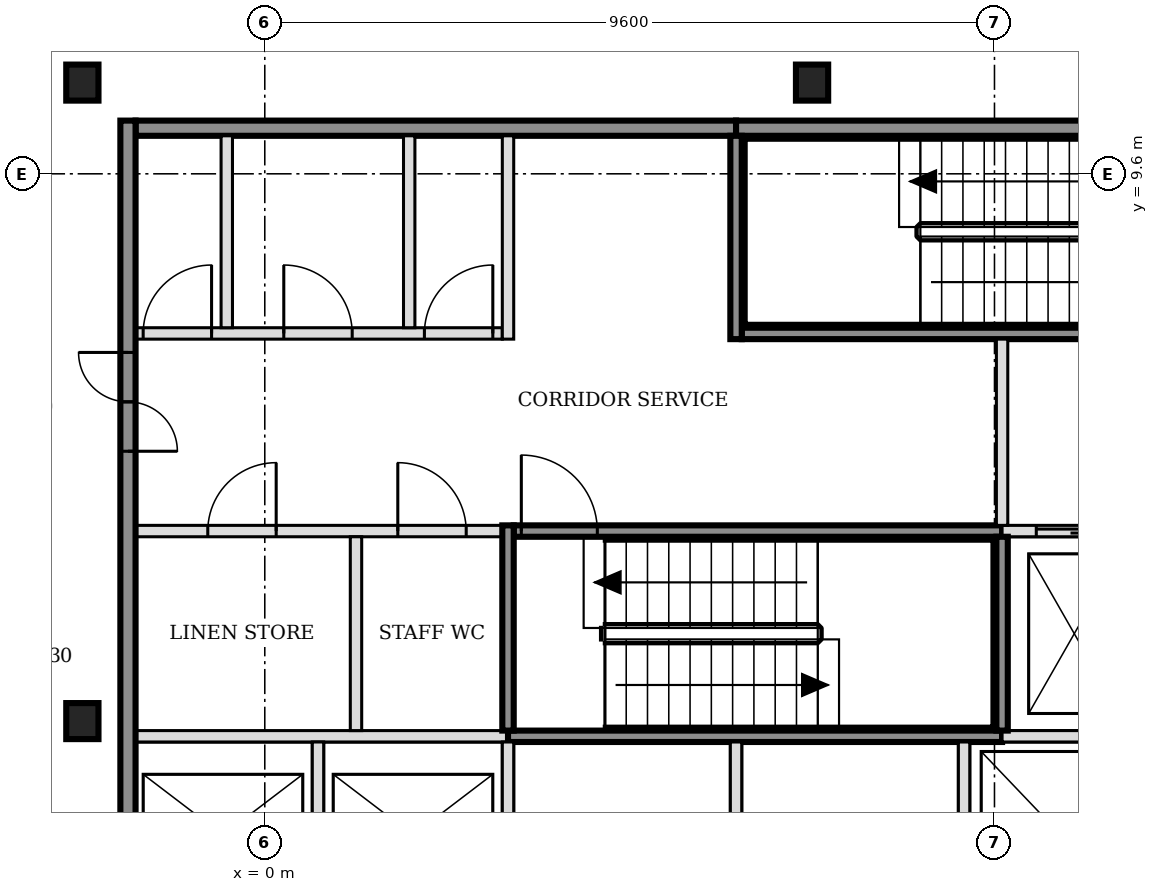
"""IFC4 building model, lengths in metres.
Left out: names, types, materials, properties, quantities, classifications, styles, units other than length and angle.
Written with IfcOpenShell. Run it as: python <this file> out.ifc"""

import sys

from ifc_helpers import new_model, si_unit, direction, frame, frame_2d, origin, origin_2d, place, context, subcontext, project, spatial, rectangle, i_section, extrude, element, fill, save


model = new_model("IFC4")
c1 = context("Model", 3, precision=1e-05, world=origin(), true_north=direction((0.0, 1.0)))
c2 = subcontext(c1, "Body", "Model", "MODEL_VIEW")
j1 = project(units=[si_unit("LENGTHUNIT", "METRE"), si_unit("PLANEANGLEUNIT", "RADIAN")], contexts=[c1])
p1 = place(None, origin())
s1 = spatial("IfcSite", under=j1, at=p1, CompositionType="ELEMENT")
p2 = place(p1, origin())
s2 = spatial("IfcBuilding", under=s1, at=p2, CompositionType="ELEMENT")
p3 = place(p2, frame((0.0, 0.0, 108.6)))
s3 = spatial("IfcBuildingStorey", under=s2, at=p3, CompositionType="ELEMENT", Elevation=108.6)
for number, where, z_axis, x_axis in (
    (1, (-2.4, 2.4, -0.15), (0.0, 0.0, 1.0), (1.0, 0.0, 0.0)),
    (2, (-2.4, 10.8, -0.15), (0.0, 0.0, 1.0), (1.0, 0.0, 0.0)),
    (3, (7.2, 10.8, -0.15), (0.0, 0.0, 1.0), (1.0, 0.0, 0.0)),
):
    element("IfcColumn", number, at=place(p3, frame(where, z_axis=z_axis, x_axis=x_axis)), inside=s3, PredefinedType="COLUMN", context=c2, shape_type="SweptSolid", body=[
        extrude(i_section(OverallWidth=0.424, OverallDepth=0.474, WebThickness=0.048, FlangeThickness=0.077, FilletRadius=0.015, at=origin_2d()), origin(), (0.0, 0.0, 1.0), 3.6),
    ])
p4 = place(p3, frame((-1.7, 2.2, 0.0), z_axis=(0.0, 0.0, 1.0), x_axis=(1.0, 0.0, 0.0)))
e4 = element("IfcWall", 4, at=p4, inside=s3, PredefinedType="SOLIDWALL", context=c2, shape_type="SweptSolid", body=[
    extrude(rectangle(XDim=4.9, YDim=0.15, at=frame_2d((2.45, 0.0))), origin(), (0.0, 0.0, 1.0), 3.45),
])
p5 = place(p3, frame((3.2, 2.2, 0.0), z_axis=(0.0, 0.0, 1.0), x_axis=(1.0, 0.0, 0.0)))
e5 = element("IfcWall", 5, at=p5, inside=s3, PredefinedType="SOLIDWALL", context=c2, shape_type="SweptSolid", body=[
    extrude(rectangle(XDim=6.5, YDim=0.15, at=frame_2d((3.25, 0.0))), origin(), (0.0, 0.0, 1.0), 3.45),
])
p6 = place(p3, frame((9.7, 2.2, 0.0), z_axis=(0.0, 0.0, 1.0), x_axis=(1.0, 0.0, 0.0)))
e6 = element("IfcWall", 6, at=p6, inside=s3, PredefinedType="SOLIDWALL", context=c2, shape_type="SweptSolid", body=[
    extrude(rectangle(XDim=4.525, YDim=0.15, at=frame_2d((2.263, 0.0))), origin(), (0.0, 0.0, 1.0), 3.45),
])
p7 = place(p3, frame((-1.7, 4.9, 0.0), z_axis=(0.0, 0.0, 1.0), x_axis=(1.0, 0.0, 0.0)))
e7 = element("IfcWall", 7, at=p7, inside=s3, PredefinedType="PARTITIONING", context=c2, shape_type="SweptSolid", body=[
    extrude(rectangle(XDim=4.825, YDim=0.15, at=frame_2d((2.413, 0.0))), origin(), (0.0, 0.0, 1.0), 3.45),
])
p8 = place(p7, frame((0.95, 0.0, 0.0)))
e8 = element("IfcOpeningElement", 8, at=p8, cuts=e7, PredefinedType="OPENING", context=c2, shape_type="SweptSolid", body=[
    extrude(rectangle(XDim=0.9, YDim=2.1, at=frame_2d((0.45, 1.05))), frame((0.0, 0.085, 0.0), z_axis=(0.0, -1.0, 0.0), x_axis=(1.0, 0.0, 0.0)), (0.0, 0.0, 1.0), 0.17),
])
p9 = place(p7, frame((3.45, 0.0, 0.0)))
e9 = element("IfcOpeningElement", 9, at=p9, cuts=e7, PredefinedType="OPENING", context=c2, shape_type="SweptSolid", body=[
    extrude(rectangle(XDim=0.9, YDim=2.1, at=frame_2d((0.45, 1.05))), frame((0.0, 0.085, 0.0), z_axis=(0.0, -1.0, 0.0), x_axis=(1.0, 0.0, 0.0)), (0.0, 0.0, 1.0), 0.17),
])
p10 = place(p3, frame((3.275, 4.9, 0.0), z_axis=(0.0, 0.0, 1.0), x_axis=(1.0, 0.0, 0.0)))
e10 = element("IfcWall", 10, at=p10, inside=s3, PredefinedType="SOLIDWALL", context=c2, shape_type="SweptSolid", body=[
    extrude(rectangle(XDim=6.425, YDim=0.15, at=frame_2d((3.212, 0.0))), origin(), (0.0, 0.0, 1.0), 3.45),
])
p11 = place(p10, frame((0.1, 0.0, 0.0)))
e11 = element("IfcOpeningElement", 11, at=p11, cuts=e10, PredefinedType="OPENING", context=c2, shape_type="SweptSolid", body=[
    extrude(rectangle(XDim=1.0, YDim=2.1, at=frame_2d((0.5, 1.05))), frame((0.0, 0.085, 0.0), z_axis=(0.0, -1.0, 0.0), x_axis=(1.0, 0.0, 0.0)), (0.0, 0.0, 1.0), 0.17),
])
p12 = place(p3, frame((9.7, 4.9, 0.0), z_axis=(0.0, 0.0, 1.0), x_axis=(1.0, 0.0, 0.0)))
e12 = element("IfcWall", 12, at=p12, inside=s3, PredefinedType="SOLIDWALL", context=c2, shape_type="SweptSolid", body=[
    extrude(rectangle(XDim=6.4, YDim=0.15, at=frame_2d((3.2, 0.0))), origin(), (0.0, 0.0, 1.0), 3.45),
])
p13 = place(p12, frame((0.45, 0.0, 0.0)))
e13 = element("IfcOpeningElement", 13, at=p13, cuts=e12, PredefinedType="OPENING", context=c2, shape_type="SweptSolid", body=[
    extrude(rectangle(XDim=1.0, YDim=2.1, at=frame_2d((0.5, 1.05))), frame((0.0, 0.085, 0.0), z_axis=(0.0, -1.0, 0.0), x_axis=(1.0, 0.0, 0.0)), (0.0, 0.0, 1.0), 0.17),
])
p14 = place(p12, frame((2.35, 0.0, 0.0)))
e14 = element("IfcOpeningElement", 14, at=p14, cuts=e12, PredefinedType="OPENING", context=c2, shape_type="SweptSolid", body=[
    extrude(rectangle(XDim=1.0, YDim=2.1, at=frame_2d((0.5, 1.05))), frame((0.0, 0.085, 0.0), z_axis=(0.0, -1.0, 0.0), x_axis=(1.0, 0.0, 0.0)), (0.0, 0.0, 1.0), 0.17),
])
p15 = place(p12, frame((4.7, 0.0, 0.0)))
e15 = element("IfcOpeningElement", 15, at=p15, cuts=e12, PredefinedType="OPENING", context=c2, shape_type="SweptSolid", body=[
    extrude(rectangle(XDim=0.9, YDim=2.1, at=frame_2d((0.45, 1.05))), frame((0.0, 0.085, 0.0), z_axis=(0.0, -1.0, 0.0), x_axis=(1.0, 0.0, 0.0)), (0.0, 0.0, 1.0), 0.17),
])
p16 = place(p3, frame((-1.7, 7.5, 0.0), z_axis=(0.0, 0.0, 1.0), x_axis=(1.0, 0.0, 0.0)))
e16 = element("IfcWall", 16, at=p16, inside=s3, PredefinedType="PARTITIONING", context=c2, shape_type="SweptSolid", body=[
    extrude(rectangle(XDim=4.825, YDim=0.15, at=frame_2d((2.413, 0.0))), origin(), (0.0, 0.0, 1.0), 3.45),
])
p17 = place(p16, frame((0.1, 0.0, 0.0)))
e17 = element("IfcOpeningElement", 17, at=p17, cuts=e16, PredefinedType="OPENING", context=c2, shape_type="SweptSolid", body=[
    extrude(rectangle(XDim=0.9, YDim=2.1, at=frame_2d((0.45, 1.05))), frame((0.0, 0.085, 0.0), z_axis=(0.0, -1.0, 0.0), x_axis=(1.0, 0.0, 0.0)), (0.0, 0.0, 1.0), 0.17),
])
p18 = place(p16, frame((1.95, 0.0, 0.0)))
e18 = element("IfcOpeningElement", 18, at=p18, cuts=e16, PredefinedType="OPENING", context=c2, shape_type="SweptSolid", body=[
    extrude(rectangle(XDim=0.9, YDim=2.1, at=frame_2d((0.45, 1.05))), frame((0.0, 0.085, 0.0), z_axis=(0.0, -1.0, 0.0), x_axis=(1.0, 0.0, 0.0)), (0.0, 0.0, 1.0), 0.17),
])
p19 = place(p16, frame((3.8, 0.0, 0.0)))
e19 = element("IfcOpeningElement", 19, at=p19, cuts=e16, PredefinedType="OPENING", context=c2, shape_type="SweptSolid", body=[
    extrude(rectangle(XDim=0.9, YDim=2.1, at=frame_2d((0.45, 1.05))), frame((0.0, 0.085, 0.0), z_axis=(0.0, -1.0, 0.0), x_axis=(1.0, 0.0, 0.0)), (0.0, 0.0, 1.0), 0.17),
])
p20 = place(p3, frame((6.275, 7.5, 0.0), z_axis=(0.0, 0.0, 1.0), x_axis=(1.0, 0.0, 0.0)))
e20 = element("IfcWall", 20, at=p20, inside=s3, PredefinedType="SOLIDWALL", context=c2, shape_type="SweptSolid", body=[
    extrude(rectangle(XDim=6.425, YDim=0.15, at=frame_2d((3.212, 0.0))), origin(), (0.0, 0.0, 1.0), 3.45),
])
p21 = place(p20, frame((5.225, 0.0, 0.0)))
e21 = element("IfcOpeningElement", 21, at=p21, cuts=e20, PredefinedType="OPENING", context=c2, shape_type="SweptSolid", body=[
    extrude(rectangle(XDim=1.0, YDim=2.1, at=frame_2d((0.5, 1.05))), frame((0.0, 0.085, 0.0), z_axis=(0.0, -1.0, 0.0), x_axis=(1.0, 0.0, 0.0)), (0.0, 0.0, 1.0), 0.17),
])
p22 = place(p3, frame((-1.7, 10.2, 0.0), z_axis=(0.0, 0.0, 1.0), x_axis=(1.0, 0.0, 0.0)))
e22 = element("IfcWall", 22, at=p22, inside=s3, PredefinedType="SOLIDWALL", context=c2, shape_type="SweptSolid", body=[
    extrude(rectangle(XDim=7.9, YDim=0.2, at=frame_2d((3.95, 0.0))), origin(), (0.0, 0.0, 1.0), 3.45),
])
p23 = place(p3, frame((6.2, 10.2, 0.0), z_axis=(0.0, 0.0, 1.0), x_axis=(1.0, 0.0, 0.0)))
e23 = element("IfcWall", 23, at=p23, inside=s3, PredefinedType="SOLIDWALL", context=c2, shape_type="SweptSolid", body=[
    extrude(rectangle(XDim=6.5, YDim=0.2, at=frame_2d((3.25, 0.0))), origin(), (0.0, 0.0, 1.0), 3.45),
])
p24 = place(p3, frame((-1.8, -5.5, 0.0), z_axis=(0.0, 0.0, 1.0), x_axis=(0.0, 1.0, 0.0)))
e24 = element("IfcWall", 24, at=p24, inside=s3, PredefinedType="SOLIDWALL", context=c2, shape_type="SweptSolid", body=[
    extrude(rectangle(XDim=15.8, YDim=0.2, at=frame_2d((7.9, 0.0))), origin(), (0.0, 0.0, 1.0), 3.45),
])
p25 = place(p24, frame((3.05, 0.0, 0.0)))
e25 = element("IfcOpeningElement", 25, at=p25, cuts=e24, PredefinedType="OPENING", context=c2, shape_type="SweptSolid", body=[
    extrude(rectangle(XDim=1.3, YDim=2.1, at=frame_2d((0.65, 1.05))), frame((0.0, 0.11, 0.0), z_axis=(0.0, -1.0, 0.0), x_axis=(1.0, 0.0, 0.0)), (0.0, 0.0, 1.0), 0.22),
])
p26 = place(p24, frame((11.45, 0.0, 0.0)))
e26 = element("IfcOpeningElement", 26, at=p26, cuts=e24, PredefinedType="OPENING", context=c2, shape_type="SweptSolid", body=[
    extrude(rectangle(XDim=1.3, YDim=2.1, at=frame_2d((0.65, 1.05))), frame((0.0, 0.11, 0.0), z_axis=(0.0, -1.0, 0.0), x_axis=(1.0, 0.0, 0.0)), (0.0, 0.0, 1.0), 0.22),
])
p27 = place(p3, frame((-0.5, 7.575, 0.0), z_axis=(0.0, 0.0, 1.0), x_axis=(0.0, 1.0, 0.0)))
e27 = element("IfcWall", 27, at=p27, inside=s3, PredefinedType="PARTITIONING", context=c2, shape_type="SweptSolid", body=[
    extrude(rectangle(XDim=2.525, YDim=0.15, at=frame_2d((1.263, 0.0))), origin(), (0.0, 0.0, 1.0), 3.45),
])
p28 = place(p3, frame((0.7, -0.325, 0.0), z_axis=(0.0, 0.0, 1.0), x_axis=(0.0, 1.0, 0.0)))
e28 = element("IfcWall", 28, at=p28, inside=s3, PredefinedType="SOLIDWALL", context=c2, shape_type="SweptSolid", body=[
    extrude(rectangle(XDim=2.45, YDim=0.15, at=frame_2d((1.225, 0.0))), origin(), (0.0, 0.0, 1.0), 3.45),
])
p29 = place(p3, frame((1.2, 2.275, 0.0), z_axis=(0.0, 0.0, 1.0), x_axis=(0.0, 1.0, 0.0)))
e29 = element("IfcWall", 29, at=p29, inside=s3, PredefinedType="PARTITIONING", context=c2, shape_type="SweptSolid", body=[
    extrude(rectangle(XDim=2.55, YDim=0.15, at=frame_2d((1.275, 0.0))), origin(), (0.0, 0.0, 1.0), 3.45),
])
p30 = place(p3, frame((1.9, 7.575, 0.0), z_axis=(0.0, 0.0, 1.0), x_axis=(0.0, 1.0, 0.0)))
e30 = element("IfcWall", 30, at=p30, inside=s3, PredefinedType="PARTITIONING", context=c2, shape_type="SweptSolid", body=[
    extrude(rectangle(XDim=2.525, YDim=0.15, at=frame_2d((1.263, 0.0))), origin(), (0.0, 0.0, 1.0), 3.45),
])
p31 = place(p3, frame((3.2, -0.325, 0.0), z_axis=(0.0, 0.0, 1.0), x_axis=(0.0, 1.0, 0.0)))
e31 = element("IfcWall", 31, at=p31, inside=s3, PredefinedType="SOLIDWALL", context=c2, shape_type="SweptSolid", body=[
    extrude(rectangle(XDim=2.45, YDim=0.15, at=frame_2d((1.225, 0.0))), origin(), (0.0, 0.0, 1.0), 3.45),
])
p32 = place(p3, frame((3.2, 2.275, 0.0), z_axis=(0.0, 0.0, 1.0), x_axis=(0.0, 1.0, 0.0)))
e32 = element("IfcWall", 32, at=p32, inside=s3, PredefinedType="SOLIDWALL", context=c2, shape_type="SweptSolid", body=[
    extrude(rectangle(XDim=2.7, YDim=0.15, at=frame_2d((1.35, 0.0))), origin(), (0.0, 0.0, 1.0), 3.45),
])
p33 = place(p3, frame((3.2, 7.425, 0.0), z_axis=(0.0, 0.0, 1.0), x_axis=(0.0, 1.0, 0.0)))
e33 = element("IfcWall", 33, at=p33, inside=s3, PredefinedType="PARTITIONING", context=c2, shape_type="SweptSolid", body=[
    extrude(rectangle(XDim=2.675, YDim=0.15, at=frame_2d((1.337, 0.0))), origin(), (0.0, 0.0, 1.0), 3.45),
])
p34 = place(p3, frame((6.2, -0.325, 0.0), z_axis=(0.0, 0.0, 1.0), x_axis=(0.0, 1.0, 0.0)))
e34 = element("IfcWall", 34, at=p34, inside=s3, PredefinedType="SOLIDWALL", context=c2, shape_type="SweptSolid", body=[
    extrude(rectangle(XDim=2.45, YDim=0.15, at=frame_2d((1.225, 0.0))), origin(), (0.0, 0.0, 1.0), 3.45),
])
p35 = place(p3, frame((6.2, 7.425, 0.0), z_axis=(0.0, 0.0, 1.0), x_axis=(0.0, 1.0, 0.0)))
e35 = element("IfcWall", 35, at=p35, inside=s3, PredefinedType="SOLIDWALL", context=c2, shape_type="SweptSolid", body=[
    extrude(rectangle(XDim=2.675, YDim=0.15, at=frame_2d((1.337, 0.0))), origin(), (0.0, 0.0, 1.0), 3.45),
])
p36 = place(p3, frame((9.2, -0.325, 0.0), z_axis=(0.0, 0.0, 1.0), x_axis=(0.0, 1.0, 0.0)))
e36 = element("IfcWall", 36, at=p36, inside=s3, PredefinedType="SOLIDWALL", context=c2, shape_type="SweptSolid", body=[
    extrude(rectangle(XDim=2.45, YDim=0.15, at=frame_2d((1.225, 0.0))), origin(), (0.0, 0.0, 1.0), 3.45),
])
p37 = place(p3, frame((9.7, 2.275, 0.0), z_axis=(0.0, 0.0, 1.0), x_axis=(0.0, 1.0, 0.0)))
e37 = element("IfcWall", 37, at=p37, inside=s3, PredefinedType="SOLIDWALL", context=c2, shape_type="SweptSolid", body=[
    extrude(rectangle(XDim=2.55, YDim=0.15, at=frame_2d((1.275, 0.0))), origin(), (0.0, 0.0, 1.0), 3.45),
])
p38 = place(p3, frame((9.7, 4.975, 0.0), z_axis=(0.0, 0.0, 1.0), x_axis=(0.0, 1.0, 0.0)))
e38 = element("IfcWall", 38, at=p38, inside=s3, PredefinedType="SOLIDWALL", context=c2, shape_type="SweptSolid", body=[
    extrude(rectangle(XDim=2.45, YDim=0.15, at=frame_2d((1.225, 0.0))), origin(), (0.0, 0.0, 1.0), 3.45),
])
p39 = place(p13, origin())
e39 = element("IfcDoor", 39, at=p39, inside=s3, OperationType="DOUBLE_DOOR_SLIDING", PredefinedType="DOOR", context=c2, shape_type="SweptSolid", body=[
    extrude(rectangle(XDim=1.0, YDim=2.1, at=frame_2d((0.5, 1.05))), frame((0.0, 0.025, 0.0), z_axis=(0.0, -1.0, 0.0), x_axis=(1.0, 0.0, 0.0)), (0.0, 0.0, 1.0), 0.05),
])
fill(e13, e39)
p40 = place(p11, origin())
e40 = element("IfcDoor", 40, at=p40, inside=s3, OperationType="SINGLE_SWING_LEFT", PredefinedType="DOOR", context=c2, shape_type="SweptSolid", body=[
    extrude(rectangle(XDim=1.0, YDim=2.1, at=frame_2d((0.5, 1.05))), frame((0.0, 0.025, 0.0), z_axis=(0.0, -1.0, 0.0), x_axis=(1.0, 0.0, 0.0)), (0.0, 0.0, 1.0), 0.05),
])
fill(e11, e40)
p41 = place(p26, origin())
e41 = element("IfcDoor", 41, at=p41, inside=s3, OperationType="DOUBLE_DOOR_SINGLE_SWING", PredefinedType="DOOR", context=c2, shape_type="SweptSolid", body=[
    extrude(rectangle(XDim=1.3, YDim=2.1, at=frame_2d((0.65, 1.05))), frame((0.0, 0.025, 0.0), z_axis=(0.0, -1.0, 0.0), x_axis=(1.0, 0.0, 0.0)), (0.0, 0.0, 1.0), 0.05),
])
fill(e26, e41)
p42 = place(p8, origin())
e42 = element("IfcDoor", 42, at=p42, inside=s3, OperationType="SINGLE_SWING_RIGHT", PredefinedType="DOOR", context=c2, shape_type="SweptSolid", body=[
    extrude(rectangle(XDim=0.9, YDim=2.1, at=frame_2d((0.45, 1.05))), frame((0.0, 0.025, 0.0), z_axis=(0.0, -1.0, 0.0), x_axis=(1.0, 0.0, 0.0)), (0.0, 0.0, 1.0), 0.05),
])
fill(e8, e42)
p43 = place(p9, origin())
e43 = element("IfcDoor", 43, at=p43, inside=s3, OperationType="SINGLE_SWING_LEFT", PredefinedType="DOOR", context=c2, shape_type="SweptSolid", body=[
    extrude(rectangle(XDim=0.9, YDim=2.1, at=frame_2d((0.45, 1.05))), frame((0.0, 0.025, 0.0), z_axis=(0.0, -1.0, 0.0), x_axis=(1.0, 0.0, 0.0)), (0.0, 0.0, 1.0), 0.05),
])
fill(e9, e43)
p44 = place(p17, origin())
e44 = element("IfcDoor", 44, at=p44, inside=s3, OperationType="SINGLE_SWING_RIGHT", PredefinedType="DOOR", context=c2, shape_type="SweptSolid", body=[
    extrude(rectangle(XDim=0.9, YDim=2.1, at=frame_2d((0.45, 1.05))), frame((0.0, 0.025, 0.0), z_axis=(0.0, -1.0, 0.0), x_axis=(1.0, 0.0, 0.0)), (0.0, 0.0, 1.0), 0.05),
])
fill(e17, e44)
p45 = place(p18, origin())
e45 = element("IfcDoor", 45, at=p45, inside=s3, OperationType="SINGLE_SWING_LEFT", PredefinedType="DOOR", context=c2, shape_type="SweptSolid", body=[
    extrude(rectangle(XDim=0.9, YDim=2.1, at=frame_2d((0.45, 1.05))), frame((0.0, 0.025, 0.0), z_axis=(0.0, -1.0, 0.0), x_axis=(1.0, 0.0, 0.0)), (0.0, 0.0, 1.0), 0.05),
])
fill(e18, e45)
p46 = place(p19, origin())
e46 = element("IfcDoor", 46, at=p46, inside=s3, OperationType="SINGLE_SWING_RIGHT", PredefinedType="DOOR", context=c2, shape_type="SweptSolid", body=[
    extrude(rectangle(XDim=0.9, YDim=2.1, at=frame_2d((0.45, 1.05))), frame((0.0, 0.025, 0.0), z_axis=(0.0, -1.0, 0.0), x_axis=(1.0, 0.0, 0.0)), (0.0, 0.0, 1.0), 0.05),
])
fill(e19, e46)
save(model, sys.argv[1])
